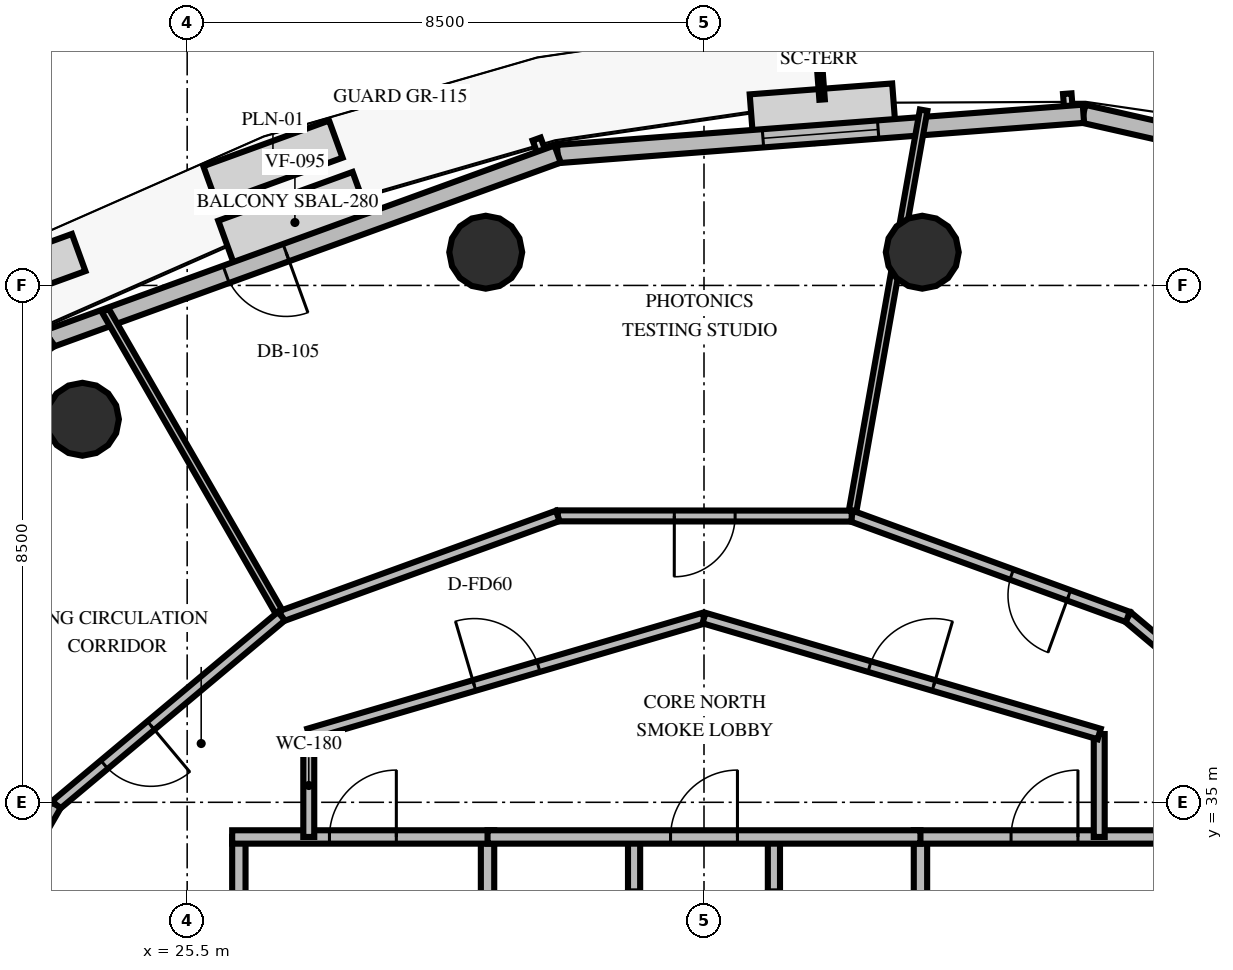
"""IFC4 building model, lengths in metres.
Left out: names, types, materials, properties, quantities, classifications, styles, units other than length and angle.
Written with IfcOpenShell. Run it as: python <this file> out.ifc"""

import sys

from ifc_helpers import new_model, si_unit, direction, frame, frame_2d, origin, origin_2d, place, context, subcontext, project, spatial, rectangle, circle, extrude, element, fill, save


model = new_model("IFC4")
c1 = context("Model", 3, precision=1e-05, world=origin(), true_north=direction((0.0, 1.0)))
c2 = subcontext(c1, "Body", "Model", "MODEL_VIEW")
j1 = project(units=[si_unit("LENGTHUNIT", "METRE"), si_unit("PLANEANGLEUNIT", "RADIAN")], contexts=[c1])
p1 = place(None, origin())
s1 = spatial("IfcSite", under=j1, at=p1, CompositionType="ELEMENT")
p2 = place(p1, origin())
s2 = spatial("IfcBuilding", under=s1, at=p2, CompositionType="ELEMENT")
p3 = place(p2, frame((0.0, 0.0, 117.8)))
s3 = spatial("IfcBuildingStorey", under=s2, at=p3, CompositionType="ELEMENT", Elevation=117.8)
for number, where, z_axis, x_axis in (
    (1, (37.59, 44.046, 0.0), (0.0, 0.0, 1.0), (1.0, 0.0, 0.0)),
    (2, (30.41, 44.046, 0.0), (0.0, 0.0, 1.0), (1.0, 0.0, 0.0)),
    (3, (23.778, 41.299, 0.0), (0.0, 0.0, 1.0), (1.0, 0.0, 0.0)),
):
    element("IfcColumn", number, at=place(p3, frame(where, z_axis=z_axis, x_axis=x_axis)), inside=s3, PredefinedType="COLUMN", context=c2, shape_type="SweptSolid", body=[
        extrude(circle(Radius=0.6, at=origin_2d()), origin(), (0.0, 0.0, 1.0), 4.0),
    ])
p4 = place(p3, frame((48.135, 44.534, 0.0), z_axis=(0.0, 0.0, 1.0), x_axis=(-0.975266584043, 0.22103187564, 0.0)))
e4 = element("IfcWall", 4, at=p4, inside=s3, PredefinedType="SOLIDWALL", context=c2, shape_type="SweptSolid", body=[
    extrude(rectangle(XDim=8.095, YDim=0.3, at=frame_2d((4.048, 0.0))), origin(), (0.0, 0.0, 1.0), 2.9),
])
p5 = place(p4, frame((3.098, 0.0, 0.8)))
e5 = element("IfcOpeningElement", 5, at=p5, cuts=e4, PredefinedType="OPENING", context=c2, shape_type="SweptSolid", body=[
    extrude(rectangle(XDim=1.9, YDim=1.95, at=frame_2d((0.95, 0.975))), frame((0.0, 0.16, 0.0), z_axis=(0.0, -1.0, 0.0), x_axis=(1.0, 0.0, 0.0)), (0.0, 0.0, 1.0), 0.32),
])
p6 = place(p3, frame((40.24, 46.323, 0.0), z_axis=(0.0, 0.0, 1.0), x_axis=(-0.997079436501, -0.076371443005, 0.0)))
e6 = element("IfcWall", 6, at=p6, inside=s3, PredefinedType="SOLIDWALL", context=c2, shape_type="SweptSolid", body=[
    extrude(rectangle(XDim=8.673, YDim=0.3, at=frame_2d((4.336, 0.0))), origin(), (0.0, 0.0, 1.0), 2.9),
])
p7 = place(p6, frame((3.386, 0.0, 0.8)))
e7 = element("IfcOpeningElement", 7, at=p7, cuts=e6, PredefinedType="OPENING", context=c2, shape_type="SweptSolid", body=[
    extrude(rectangle(XDim=1.9, YDim=1.95, at=frame_2d((0.95, 0.975))), frame((0.0, 0.16, 0.0), z_axis=(0.0, -1.0, 0.0), x_axis=(1.0, 0.0, 0.0)), (0.0, 0.0, 1.0), 0.32),
])
p8 = place(p3, frame((31.593, 45.661, 0.0), z_axis=(0.0, 0.0, 1.0), x_axis=(-0.939992901383, -0.341193999582, 0.0)))
e8 = element("IfcWall", 8, at=p8, inside=s3, PredefinedType="SOLIDWALL", context=c2, shape_type="SweptSolid", body=[
    extrude(rectangle(XDim=8.891, YDim=0.3, at=frame_2d((4.445, 0.0))), origin(), (0.0, 0.0, 1.0), 2.9),
])
p9 = place(p8, frame((4.75, 0.0, 0.0)))
e9 = element("IfcOpeningElement", 9, at=p9, cuts=e8, PredefinedType="OPENING", context=c2, shape_type="SweptSolid", body=[
    extrude(rectangle(XDim=1.05, YDim=2.15, at=frame_2d((0.525, 1.075))), frame((0.0, 0.16, 0.0), z_axis=(0.0, -1.0, 0.0), x_axis=(1.0, 0.0, 0.0)), (0.0, 0.0, 1.0), 0.32),
])
p10 = place(p3, frame((23.236, 42.627, 0.0), z_axis=(0.0, 0.0, 1.0), x_axis=(-0.8139046132, -0.580998520317, 0.0)))
e10 = element("IfcWall", 10, at=p10, inside=s3, PredefinedType="SOLIDWALL", context=c2, shape_type="SweptSolid", body=[
    extrude(rectangle(XDim=8.673, YDim=0.3, at=frame_2d((4.336, 0.0))), origin(), (0.0, 0.0, 1.0), 2.9),
])
p11 = place(p10, frame((3.386, 0.0, 0.8)))
e11 = element("IfcOpeningElement", 11, at=p11, cuts=e10, PredefinedType="OPENING", context=c2, shape_type="SweptSolid", body=[
    extrude(rectangle(XDim=1.9, YDim=1.95, at=frame_2d((0.95, 0.975))), frame((0.0, 0.16, 0.0), z_axis=(0.0, -1.0, 0.0), x_axis=(1.0, 0.0, 0.0)), (0.0, 0.0, 1.0), 0.32),
])
p12 = place(p3, frame((26.35, 30.05, 0.0), z_axis=(0.0, 0.0, 1.0), x_axis=(0.0, 1.0, 0.0)))
e12 = element("IfcWall", 12, at=p12, inside=s3, PredefinedType="SOLIDWALL", context=c2, shape_type="SweptSolid", body=[
    extrude(rectangle(XDim=4.38, YDim=0.22, at=frame_2d((2.19, 0.0))), origin(), (0.0, 0.0, 1.0), 2.8),
])
p13 = place(p3, frame((30.44, 30.05, 0.0), z_axis=(0.0, 0.0, 1.0), x_axis=(0.0, 1.0, 0.0)))
e13 = element("IfcWall", 13, at=p13, inside=s3, PredefinedType="SOLIDWALL", context=c2, shape_type="SweptSolid", body=[
    extrude(rectangle(XDim=4.38, YDim=0.22, at=frame_2d((2.19, 0.0))), origin(), (0.0, 0.0, 1.0), 2.8),
])
p14 = place(p13, frame((0.8, 0.0, 0.0)))
e14 = element("IfcOpeningElement", 14, at=p14, cuts=e13, PredefinedType="OPENING", context=c2, shape_type="SweptSolid", body=[
    extrude(rectangle(XDim=1.05, YDim=2.1, at=frame_2d((0.525, 1.05))), frame((0.0, 0.12, 0.0), z_axis=(0.0, -1.0, 0.0), x_axis=(1.0, 0.0, 0.0)), (0.0, 0.0, 1.0), 0.24),
])
p15 = place(p3, frame((26.24, 34.43, 0.0), z_axis=(0.0, 0.0, 1.0), x_axis=(1.0, 0.0, 0.0)))
e15 = element("IfcWall", 15, at=p15, inside=s3, PredefinedType="SOLIDWALL", context=c2, shape_type="SweptSolid", body=[
    extrude(rectangle(XDim=4.31, YDim=0.22, at=frame_2d((2.155, 0.0))), origin(), (0.0, 0.0, 1.0), 2.8),
])
p16 = place(p15, frame((1.6, 0.0, 0.0)))
e16 = element("IfcOpeningElement", 16, at=p16, cuts=e15, PredefinedType="OPENING", context=c2, shape_type="SweptSolid", body=[
    extrude(rectangle(XDim=1.1, YDim=2.15, at=frame_2d((0.55, 1.075))), frame((0.0, 0.12, 0.0), z_axis=(0.0, -1.0, 0.0), x_axis=(1.0, 0.0, 0.0)), (0.0, 0.0, 1.0), 0.24),
])
p17 = place(p3, frame((32.85, 30.05, 0.0), z_axis=(0.0, 0.0, 1.0), x_axis=(0.0, 1.0, 0.0)))
e17 = element("IfcWall", 17, at=p17, inside=s3, PredefinedType="SOLIDWALL", context=c2, shape_type="SweptSolid", body=[
    extrude(rectangle(XDim=4.38, YDim=0.2, at=frame_2d((2.19, 0.0))), origin(), (0.0, 0.0, 1.0), 2.8),
])
p18 = place(p17, frame((2.65, 0.0, 0.0)))
e18 = element("IfcOpeningElement", 18, at=p18, cuts=e17, PredefinedType="OPENING", context=c2, shape_type="SweptSolid", body=[
    extrude(rectangle(XDim=0.86, YDim=2.05, at=frame_2d((0.43, 1.025))), frame((0.0, 0.11, 0.0), z_axis=(0.0, -1.0, 0.0), x_axis=(1.0, 0.0, 0.0)), (0.0, 0.0, 1.0), 0.22),
])
p19 = place(p3, frame((37.56, 30.05, 0.0), z_axis=(0.0, 0.0, 1.0), x_axis=(0.0, 1.0, 0.0)))
e19 = element("IfcWall", 19, at=p19, inside=s3, PredefinedType="SOLIDWALL", context=c2, shape_type="SweptSolid", body=[
    extrude(rectangle(XDim=4.38, YDim=0.22, at=frame_2d((2.19, 0.0))), origin(), (0.0, 0.0, 1.0), 2.8),
])
p20 = place(p19, frame((0.8, 0.0, 0.0)))
e20 = element("IfcOpeningElement", 20, at=p20, cuts=e19, PredefinedType="OPENING", context=c2, shape_type="SweptSolid", body=[
    extrude(rectangle(XDim=1.05, YDim=2.1, at=frame_2d((0.525, 1.05))), frame((0.0, 0.12, 0.0), z_axis=(0.0, -1.0, 0.0), x_axis=(1.0, 0.0, 0.0)), (0.0, 0.0, 1.0), 0.24),
])
p21 = place(p3, frame((37.45, 34.43, 0.0), z_axis=(0.0, 0.0, 1.0), x_axis=(1.0, 0.0, 0.0)))
e21 = element("IfcWall", 21, at=p21, inside=s3, PredefinedType="SOLIDWALL", context=c2, shape_type="SweptSolid", body=[
    extrude(rectangle(XDim=4.31, YDim=0.22, at=frame_2d((2.155, 0.0))), origin(), (0.0, 0.0, 1.0), 2.8),
])
p22 = place(p21, frame((1.6, 0.0, 0.0)))
e22 = element("IfcOpeningElement", 22, at=p22, cuts=e21, PredefinedType="OPENING", context=c2, shape_type="SweptSolid", body=[
    extrude(rectangle(XDim=1.1, YDim=2.15, at=frame_2d((0.55, 1.075))), frame((0.0, 0.12, 0.0), z_axis=(0.0, -1.0, 0.0), x_axis=(1.0, 0.0, 0.0)), (0.0, 0.0, 1.0), 0.24),
])
p23 = place(p3, frame((35.15, 30.05, 0.0), z_axis=(0.0, 0.0, 1.0), x_axis=(0.0, 1.0, 0.0)))
e23 = element("IfcWall", 23, at=p23, inside=s3, PredefinedType="SOLIDWALL", context=c2, shape_type="SweptSolid", body=[
    extrude(rectangle(XDim=4.38, YDim=0.2, at=frame_2d((2.19, 0.0))), origin(), (0.0, 0.0, 1.0), 2.8),
])
p24 = place(p23, frame((2.65, 0.0, 0.0)))
e24 = element("IfcOpeningElement", 24, at=p24, cuts=e23, PredefinedType="OPENING", context=c2, shape_type="SweptSolid", body=[
    extrude(rectangle(XDim=0.86, YDim=2.05, at=frame_2d((0.43, 1.025))), frame((0.0, 0.11, 0.0), z_axis=(0.0, -1.0, 0.0), x_axis=(1.0, 0.0, 0.0)), (0.0, 0.0, 1.0), 0.22),
])
p25 = place(p3, frame((30.44, 34.43, 0.0), z_axis=(0.0, 0.0, 1.0), x_axis=(1.0, 0.0, 0.0)))
e25 = element("IfcWall", 25, at=p25, inside=s3, PredefinedType="SOLIDWALL", context=c2, shape_type="SweptSolid", body=[
    extrude(rectangle(XDim=7.12, YDim=0.22, at=frame_2d((3.56, 0.0))), origin(), (0.0, 0.0, 1.0), 2.8),
])
p26 = place(p25, frame((3.01, 0.0, 0.0)))
e26 = element("IfcOpeningElement", 26, at=p26, cuts=e25, PredefinedType="OPENING", context=c2, shape_type="SweptSolid", body=[
    extrude(rectangle(XDim=1.1, YDim=2.15, at=frame_2d((0.55, 1.075))), frame((0.0, 0.12, 0.0), z_axis=(0.0, -1.0, 0.0), x_axis=(1.0, 0.0, 0.0)), (0.0, 0.0, 1.0), 0.24),
])
for number, where, z_axis, x_axis in (
    (27, (27.5, 34.43, 0.0), (0.0, 0.0, 1.0), (0.0, 1.0, 0.0)),
    (28, (40.5, 36.123, 0.0), (0.0, 0.0, 1.0), (0.0, -1.0, 0.0)),
):
    element("IfcWall", number, at=place(p3, frame(where, z_axis=z_axis, x_axis=x_axis)), inside=s3, PredefinedType="PARTITIONING", context=c2, shape_type="SweptSolid", body=[
        extrude(rectangle(XDim=1.693, YDim=0.18, at=frame_2d((0.846, 0.0))), origin(), (0.0, 0.0, 1.0), 2.8),
    ])
p27 = place(p3, frame((27.5, 36.123, 0.0), z_axis=(0.0, 0.0, 1.0), x_axis=(0.959546654541, 0.281549671923, 0.0)))
e29 = element("IfcWall", 29, at=p27, inside=s3, PredefinedType="PARTITIONING", context=c2, shape_type="SweptSolid", body=[
    extrude(rectangle(XDim=6.774, YDim=0.18, at=frame_2d((3.387, 0.0))), origin(), (0.0, 0.0, 1.0), 2.8),
])
p28 = place(p27, frame((2.837, 0.0, 0.0)))
e30 = element("IfcOpeningElement", 30, at=p28, cuts=e29, PredefinedType="OPENING", context=c2, shape_type="SweptSolid", body=[
    extrude(rectangle(XDim=1.1, YDim=2.15, at=frame_2d((0.55, 1.075))), frame((0.0, 0.1, 0.0), z_axis=(0.0, -1.0, 0.0), x_axis=(1.0, 0.0, 0.0)), (0.0, 0.0, 1.0), 0.2),
])
p29 = place(p3, frame((34.0, 38.03, 0.0), z_axis=(0.0, 0.0, 1.0), x_axis=(0.959546654541, -0.281549671923, 0.0)))
e31 = element("IfcWall", 31, at=p29, inside=s3, PredefinedType="PARTITIONING", context=c2, shape_type="SweptSolid", body=[
    extrude(rectangle(XDim=6.774, YDim=0.18, at=frame_2d((3.387, 0.0))), origin(), (0.0, 0.0, 1.0), 2.8),
])
p30 = place(p29, frame((2.837, 0.0, 0.0)))
e32 = element("IfcOpeningElement", 32, at=p30, cuts=e31, PredefinedType="OPENING", context=c2, shape_type="SweptSolid", body=[
    extrude(rectangle(XDim=1.1, YDim=2.15, at=frame_2d((0.55, 1.075))), frame((0.0, 0.1, 0.0), z_axis=(0.0, -1.0, 0.0), x_axis=(1.0, 0.0, 0.0)), (0.0, 0.0, 1.0), 0.2),
])
p31 = place(p3, frame((36.429, 39.706, 0.0), z_axis=(0.0, 0.0, 1.0), x_axis=(0.174498091195, 0.984657512117, 0.0)))
e33 = element("IfcWall", 33, at=p31, inside=s3, PredefinedType="PARTITIONING", context=c2, shape_type="SweptSolid", body=[
    extrude(rectangle(XDim=6.78, YDim=0.125, at=frame_2d((3.39, 0.0))), origin(), (0.0, 0.0, 1.0), 2.8),
])
p32 = place(p3, frame((44.671, 34.938, 0.0), z_axis=(0.0, 0.0, 1.0), x_axis=(-0.765474013993, 0.643466808702, 0.0)))
e34 = element("IfcWall", 34, at=p32, inside=s3, PredefinedType="PARTITIONING", context=c2, shape_type="SweptSolid", body=[
    extrude(rectangle(XDim=4.834, YDim=0.18, at=frame_2d((2.417, 0.0))), origin(), (0.0, 0.0, 1.0), 2.8),
])
p33 = place(p3, frame((40.97, 38.049, 0.0), z_axis=(0.0, 0.0, 1.0), x_axis=(-0.939403536329, 0.342813354368, 0.0)))
e35 = element("IfcWall", 35, at=p33, inside=s3, PredefinedType="PARTITIONING", context=c2, shape_type="SweptSolid", body=[
    extrude(rectangle(XDim=4.834, YDim=0.18, at=frame_2d((2.417, 0.0))), origin(), (0.0, 0.0, 1.0), 2.8),
])
p34 = place(p33, frame((1.034, 0.0, 0.0)))
e36 = element("IfcOpeningElement", 36, at=p34, cuts=e35, PredefinedType="OPENING", context=c2, shape_type="SweptSolid", body=[
    extrude(rectangle(XDim=1.0, YDim=2.15, at=frame_2d((0.5, 1.075))), frame((0.0, 0.1, 0.0), z_axis=(0.0, -1.0, 0.0), x_axis=(1.0, 0.0, 0.0)), (0.0, 0.0, 1.0), 0.2),
])
p35 = place(p3, frame((27.051, 38.061, 0.0), z_axis=(0.0, 0.0, 1.0), x_axis=(-0.499221008812, 0.866474687663, 0.0)))
e37 = element("IfcWall", 37, at=p35, inside=s3, PredefinedType="PARTITIONING", context=c2, shape_type="SweptSolid", body=[
    extrude(rectangle(XDim=5.803, YDim=0.125, at=frame_2d((2.902, 0.0))), origin(), (0.0, 0.0, 1.0), 2.8),
])
p36 = place(p3, frame((36.429, 39.706, 0.0), z_axis=(0.0, 0.0, 1.0), x_axis=(-0.999999586861, 0.000908998715, 0.0)))
e38 = element("IfcWall", 38, at=p36, inside=s3, PredefinedType="PARTITIONING", context=c2, shape_type="SweptSolid", body=[
    extrude(rectangle(XDim=4.834, YDim=0.18, at=frame_2d((2.417, 0.0))), origin(), (0.0, 0.0, 1.0), 2.8),
])
p37 = place(p36, frame((1.917, 0.0, 0.0)))
e39 = element("IfcOpeningElement", 39, at=p37, cuts=e38, PredefinedType="OPENING", context=c2, shape_type="SweptSolid", body=[
    extrude(rectangle(XDim=1.0, YDim=2.15, at=frame_2d((0.5, 1.075))), frame((0.0, 0.1, 0.0), z_axis=(0.0, -1.0, 0.0), x_axis=(1.0, 0.0, 0.0)), (0.0, 0.0, 1.0), 0.2),
])
p38 = place(p3, frame((31.595, 39.711, 0.0), z_axis=(0.0, 0.0, 1.0), x_axis=(-0.939977597515, -0.341236158943, 0.0)))
e40 = element("IfcWall", 40, at=p38, inside=s3, PredefinedType="PARTITIONING", context=c2, shape_type="SweptSolid", body=[
    extrude(rectangle(XDim=4.834, YDim=0.18, at=frame_2d((2.417, 0.0))), origin(), (0.0, 0.0, 1.0), 2.8),
])
p39 = place(p3, frame((27.051, 38.061, 0.0), z_axis=(0.0, 0.0, 1.0), x_axis=(-0.766604462261, -0.642119613811, 0.0)))
e41 = element("IfcWall", 41, at=p39, inside=s3, PredefinedType="PARTITIONING", context=c2, shape_type="SweptSolid", body=[
    extrude(rectangle(XDim=4.834, YDim=0.18, at=frame_2d((2.417, 0.0))), origin(), (0.0, 0.0, 1.0), 2.8),
])
p40 = place(p39, frame((2.801, 0.0, 0.0)))
e42 = element("IfcOpeningElement", 42, at=p40, cuts=e41, PredefinedType="OPENING", context=c2, shape_type="SweptSolid", body=[
    extrude(rectangle(XDim=1.0, YDim=2.15, at=frame_2d((0.5, 1.075))), frame((0.0, 0.1, 0.0), z_axis=(0.0, -1.0, 0.0), x_axis=(1.0, 0.0, 0.0)), (0.0, 0.0, 1.0), 0.2),
])
p41 = place(p3, frame((23.344, 34.957, 0.0), z_axis=(0.0, 0.0, 1.0), x_axis=(-0.500765511673, -0.865582984074, 0.0)))
e43 = element("IfcWall", 43, at=p41, inside=s3, PredefinedType="PARTITIONING", context=c2, shape_type="SweptSolid", body=[
    extrude(rectangle(XDim=4.834, YDim=0.18, at=frame_2d((2.417, 0.0))), origin(), (0.0, 0.0, 1.0), 2.8),
])
p42 = place(p7, origin())
e44 = element("IfcWindow", 44, at=p42, inside=s3, PartitioningType="SINGLE_PANEL", PredefinedType="WINDOW", context=c2, shape_type="SweptSolid", body=[
    extrude(rectangle(XDim=1.9, YDim=1.95, at=frame_2d((0.95, 0.975))), frame((0.0, 0.03, 0.0), z_axis=(0.0, -1.0, 0.0), x_axis=(1.0, 0.0, 0.0)), (0.0, 0.0, 1.0), 0.06),
])
fill(e7, e44)
p43 = place(p9, origin())
e45 = element("IfcDoor", 45, at=p43, inside=s3, OperationType="SINGLE_SWING_LEFT", PredefinedType="DOOR", context=c2, shape_type="SweptSolid", body=[
    extrude(rectangle(XDim=1.05, YDim=2.15, at=frame_2d((0.525, 1.075))), frame((0.0, 0.025, 0.0), z_axis=(0.0, -1.0, 0.0), x_axis=(1.0, 0.0, 0.0)), (0.0, 0.0, 1.0), 0.05),
])
fill(e9, e45)
p44 = place(p16, origin())
e46 = element("IfcDoor", 46, at=p44, inside=s3, OperationType="SINGLE_SWING_RIGHT", PredefinedType="DOOR", context=c2, shape_type="SweptSolid", body=[
    extrude(rectangle(XDim=1.1, YDim=2.15, at=frame_2d((0.55, 1.075))), frame((0.0, 0.025, 0.0), z_axis=(0.0, -1.0, 0.0), x_axis=(1.0, 0.0, 0.0)), (0.0, 0.0, 1.0), 0.05),
])
fill(e16, e46)
p45 = place(p18, origin())
e47 = element("IfcDoor", 47, at=p45, inside=s3, OperationType="SINGLE_SWING_LEFT", PredefinedType="TRAPDOOR", context=c2, shape_type="SweptSolid", body=[
    extrude(rectangle(XDim=0.86, YDim=2.05, at=frame_2d((0.43, 1.025))), frame((0.0, 0.025, 0.0), z_axis=(0.0, -1.0, 0.0), x_axis=(1.0, 0.0, 0.0)), (0.0, 0.0, 1.0), 0.05),
])
fill(e18, e47)
p46 = place(p22, origin())
e48 = element("IfcDoor", 48, at=p46, inside=s3, OperationType="SINGLE_SWING_RIGHT", PredefinedType="DOOR", context=c2, shape_type="SweptSolid", body=[
    extrude(rectangle(XDim=1.1, YDim=2.15, at=frame_2d((0.55, 1.075))), frame((0.0, 0.025, 0.0), z_axis=(0.0, -1.0, 0.0), x_axis=(1.0, 0.0, 0.0)), (0.0, 0.0, 1.0), 0.05),
])
fill(e22, e48)
p47 = place(p24, origin())
e49 = element("IfcDoor", 49, at=p47, inside=s3, OperationType="SINGLE_SWING_LEFT", PredefinedType="TRAPDOOR", context=c2, shape_type="SweptSolid", body=[
    extrude(rectangle(XDim=0.86, YDim=2.05, at=frame_2d((0.43, 1.025))), frame((0.0, 0.025, 0.0), z_axis=(0.0, -1.0, 0.0), x_axis=(1.0, 0.0, 0.0)), (0.0, 0.0, 1.0), 0.05),
])
fill(e24, e49)
p48 = place(p26, origin())
e50 = element("IfcDoor", 50, at=p48, inside=s3, OperationType="SINGLE_SWING_RIGHT", PredefinedType="DOOR", context=c2, shape_type="SweptSolid", body=[
    extrude(rectangle(XDim=1.1, YDim=2.15, at=frame_2d((0.55, 1.075))), frame((0.0, 0.025, 0.0), z_axis=(0.0, -1.0, 0.0), x_axis=(1.0, 0.0, 0.0)), (0.0, 0.0, 1.0), 0.05),
])
fill(e26, e50)
p49 = place(p28, origin())
e51 = element("IfcDoor", 51, at=p49, inside=s3, OperationType="SINGLE_SWING_LEFT", PredefinedType="DOOR", context=c2, shape_type="SweptSolid", body=[
    extrude(rectangle(XDim=1.1, YDim=2.15, at=frame_2d((0.55, 1.075))), frame((0.0, 0.025, 0.0), z_axis=(0.0, -1.0, 0.0), x_axis=(1.0, 0.0, 0.0)), (0.0, 0.0, 1.0), 0.05),
])
fill(e30, e51)
p50 = place(p30, origin())
e52 = element("IfcDoor", 52, at=p50, inside=s3, OperationType="SINGLE_SWING_RIGHT", PredefinedType="DOOR", context=c2, shape_type="SweptSolid", body=[
    extrude(rectangle(XDim=1.1, YDim=2.15, at=frame_2d((0.55, 1.075))), frame((0.0, 0.025, 0.0), z_axis=(0.0, -1.0, 0.0), x_axis=(1.0, 0.0, 0.0)), (0.0, 0.0, 1.0), 0.05),
])
fill(e32, e52)
p51 = place(p34, origin())
e53 = element("IfcDoor", 53, at=p51, inside=s3, OperationType="SINGLE_SWING_LEFT", PredefinedType="DOOR", context=c2, shape_type="SweptSolid", body=[
    extrude(rectangle(XDim=1.0, YDim=2.15, at=frame_2d((0.5, 1.075))), frame((0.0, 0.025, 0.0), z_axis=(0.0, -1.0, 0.0), x_axis=(1.0, 0.0, 0.0)), (0.0, 0.0, 1.0), 0.05),
])
fill(e36, e53)
p52 = place(p37, origin())
e54 = element("IfcDoor", 54, at=p52, inside=s3, OperationType="SINGLE_SWING_RIGHT", PredefinedType="DOOR", context=c2, shape_type="SweptSolid", body=[
    extrude(rectangle(XDim=1.0, YDim=2.15, at=frame_2d((0.5, 1.075))), frame((0.0, 0.025, 0.0), z_axis=(0.0, -1.0, 0.0), x_axis=(1.0, 0.0, 0.0)), (0.0, 0.0, 1.0), 0.05),
])
fill(e39, e54)
p53 = place(p40, origin())
e55 = element("IfcDoor", 55, at=p53, inside=s3, OperationType="SINGLE_SWING_LEFT", PredefinedType="DOOR", context=c2, shape_type="SweptSolid", body=[
    extrude(rectangle(XDim=1.0, YDim=2.15, at=frame_2d((0.5, 1.075))), frame((0.0, 0.025, 0.0), z_axis=(0.0, -1.0, 0.0), x_axis=(1.0, 0.0, 0.0)), (0.0, 0.0, 1.0), 0.05),
])
fill(e42, e55)
save(model, sys.argv[1])
